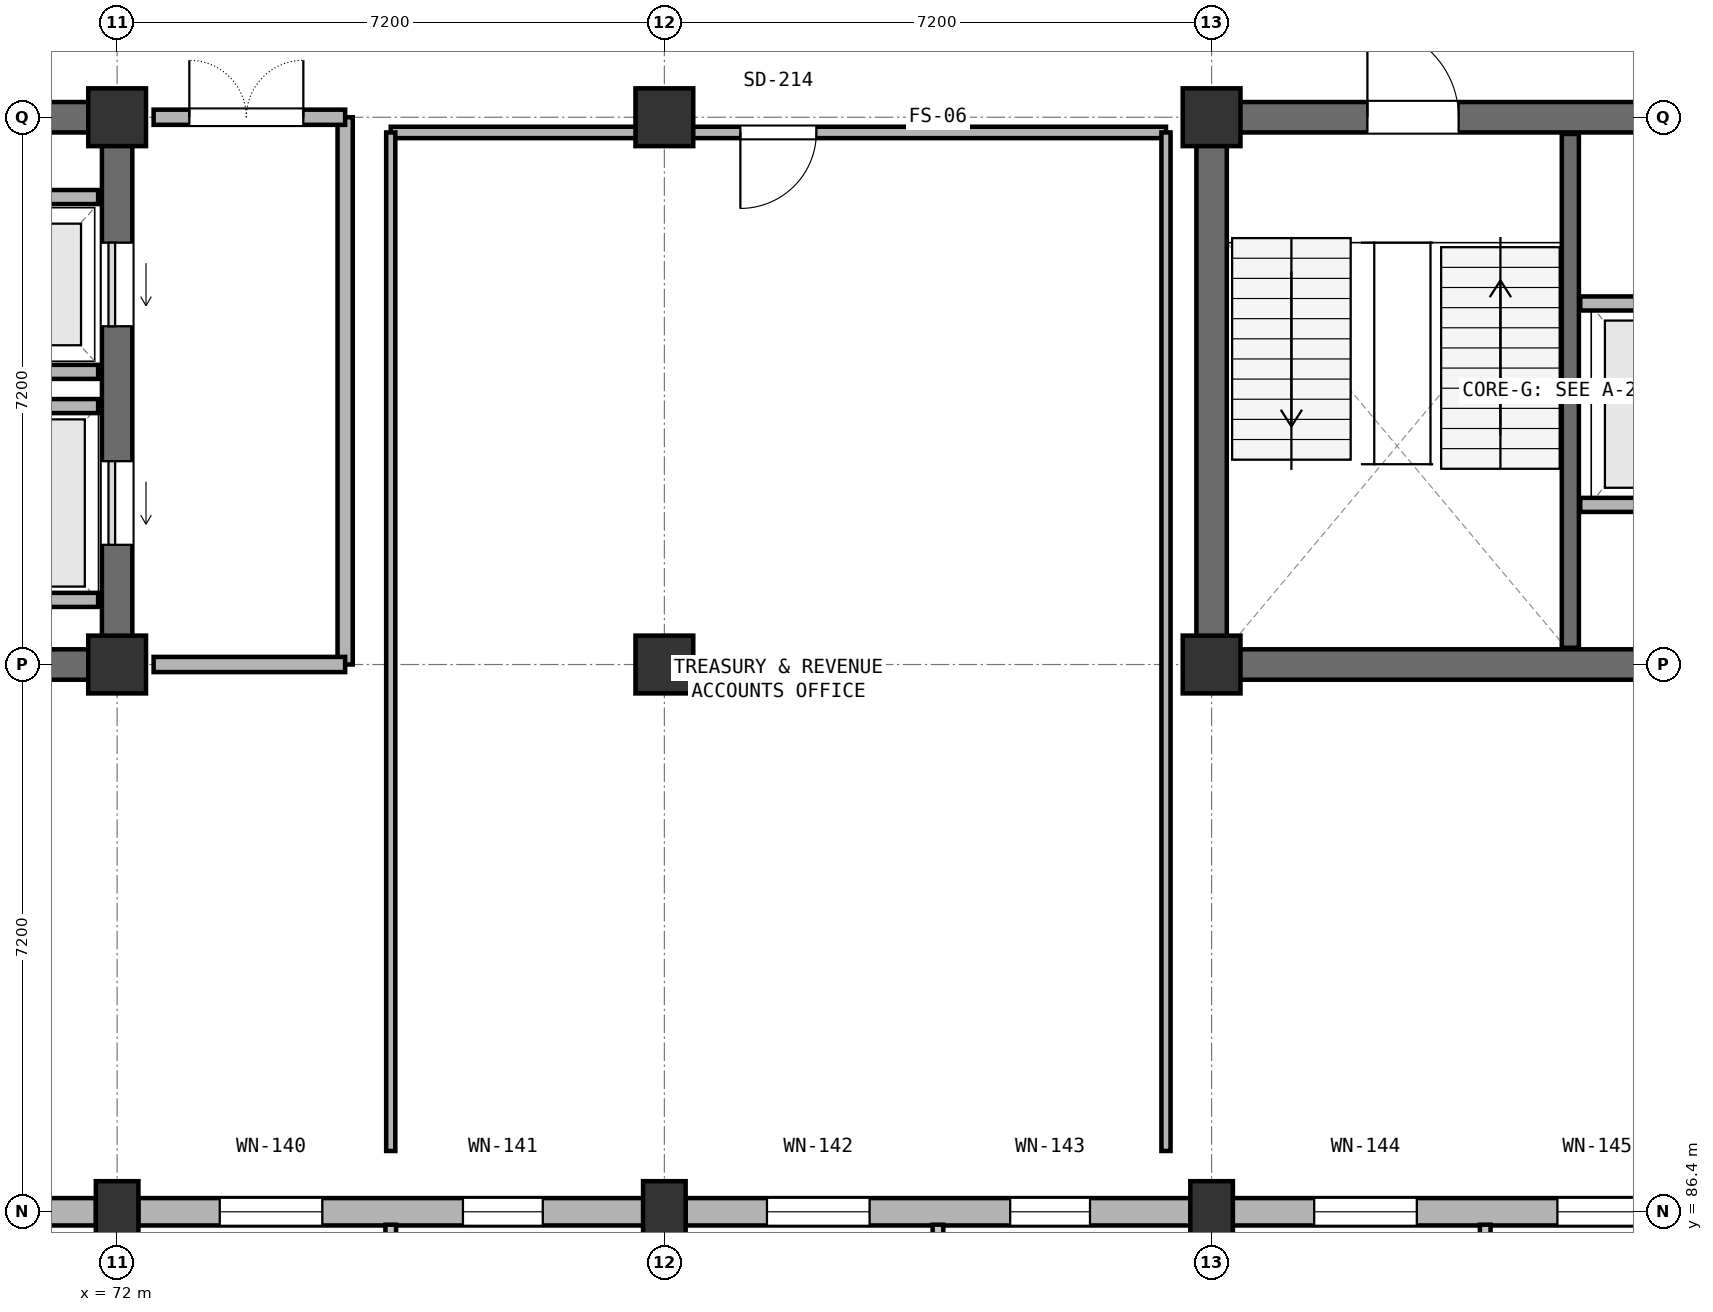
"""IFC4 building model, lengths in metres.
Left out: names, types, materials, properties, quantities, classifications, styles, units other than length and angle.
Written with IfcOpenShell. Run it as: python <this file> out.ifc"""

import sys

from ifc_helpers import new_model, si_unit, direction, frame, frame_2d, origin, origin_2d, place, context, subcontext, project, spatial, rectangle, extrude, element, fill, save


model = new_model("IFC4")
c1 = context("Model", 3, precision=1e-05, world=origin(), true_north=direction((0.0, 1.0)))
c2 = subcontext(c1, "Body", "Model", "MODEL_VIEW")
j1 = project(units=[si_unit("LENGTHUNIT", "METRE"), si_unit("PLANEANGLEUNIT", "RADIAN")], contexts=[c1])
p1 = place(None, origin())
s1 = spatial("IfcSite", under=j1, at=p1, CompositionType="ELEMENT")
p2 = place(p1, origin())
s2 = spatial("IfcBuilding", under=s1, at=p2, CompositionType="ELEMENT")
p3 = place(p2, frame((0.0, 0.0, 18.6)))
s3 = spatial("IfcBuildingStorey", under=s2, at=p3, CompositionType="ELEMENT", Elevation=18.6)
p4 = place(p3, frame((72.0, 86.4, 0.0), z_axis=(0.0, 0.0, 1.0), x_axis=(1.0, 0.0, 0.0)))
e1 = element("IfcColumn", 1, at=p4, inside=s3, PredefinedType="COLUMN", context=c2, shape_type="SweptSolid", body=[
    extrude(rectangle(XDim=0.56, YDim=0.805, at=origin_2d()), origin(), (0.0, 0.0, 1.0), 3.9),
])
for number, where, z_axis, x_axis in (
    (2, (72.0, 93.6, 0.0), (0.0, 0.0, 1.0), (1.0, 0.0, 0.0)),
    (3, (72.0, 100.8, 0.0), (0.0, 0.0, 1.0), (1.0, 0.0, 0.0)),
):
    element("IfcColumn", number, at=place(p3, frame(where, z_axis=z_axis, x_axis=x_axis)), inside=s3, PredefinedType="COLUMN", context=c2, shape_type="SweptSolid", body=[
        extrude(rectangle(XDim=0.76, YDim=0.76, at=origin_2d()), origin(), (0.0, 0.0, 1.0), 3.9),
    ])
p5 = place(p3, frame((79.2, 86.4, 0.0), z_axis=(0.0, 0.0, 1.0), x_axis=(1.0, 0.0, 0.0)))
e4 = element("IfcColumn", 4, at=p5, inside=s3, PredefinedType="COLUMN", context=c2, shape_type="SweptSolid", body=[
    extrude(rectangle(XDim=0.56, YDim=0.805, at=origin_2d()), origin(), (0.0, 0.0, 1.0), 3.9),
])
for number, where, z_axis, x_axis in (
    (5, (79.2, 93.6, 0.0), (0.0, 0.0, 1.0), (1.0, 0.0, 0.0)),
    (6, (79.2, 100.8, 0.0), (0.0, 0.0, 1.0), (1.0, 0.0, 0.0)),
):
    element("IfcColumn", number, at=place(p3, frame(where, z_axis=z_axis, x_axis=x_axis)), inside=s3, PredefinedType="COLUMN", context=c2, shape_type="SweptSolid", body=[
        extrude(rectangle(XDim=0.76, YDim=0.76, at=origin_2d()), origin(), (0.0, 0.0, 1.0), 3.9),
    ])
p6 = place(p3, frame((86.4, 86.4, 0.0), z_axis=(0.0, 0.0, 1.0), x_axis=(1.0, 0.0, 0.0)))
e7 = element("IfcColumn", 7, at=p6, inside=s3, PredefinedType="COLUMN", context=c2, shape_type="SweptSolid", body=[
    extrude(rectangle(XDim=0.56, YDim=0.805, at=origin_2d()), origin(), (0.0, 0.0, 1.0), 3.9),
])
for number, where, z_axis, x_axis in (
    (8, (86.4, 93.6, 0.0), (0.0, 0.0, 1.0), (1.0, 0.0, 0.0)),
    (9, (86.4, 100.8, 0.0), (0.0, 0.0, 1.0), (1.0, 0.0, 0.0)),
):
    element("IfcColumn", number, at=place(p3, frame(where, z_axis=z_axis, x_axis=x_axis)), inside=s3, PredefinedType="COLUMN", context=c2, shape_type="SweptSolid", body=[
        extrude(rectangle(XDim=0.76, YDim=0.76, at=origin_2d()), origin(), (0.0, 0.0, 1.0), 3.9),
    ])
p7 = place(p3, frame((65.15, 93.6, 0.0), z_axis=(0.0, 0.0, 1.0), x_axis=(1.0, 0.0, 0.0)))
e10 = element("IfcWall", 10, at=p7, inside=s3, PredefinedType="SHEAR", context=c2, shape_type="SweptSolid", body=[
    extrude(rectangle(XDim=6.5, YDim=0.4, at=frame_2d((3.25, 0.0))), origin(), (0.0, 0.0, 1.0), 3.9),
])
p8 = place(p3, frame((72.0, 93.95, 0.0), z_axis=(0.0, 0.0, 1.0), x_axis=(0.0, 1.0, 0.0)))
e11 = element("IfcWall", 11, at=p8, inside=s3, PredefinedType="SHEAR", context=c2, shape_type="SweptSolid", body=[
    extrude(rectangle(XDim=6.5, YDim=0.4, at=frame_2d((3.25, 0.0))), origin(), (0.0, 0.0, 1.0), 3.9),
])
p9 = place(p8, frame((1.225, 0.0, 0.0)))
e12 = element("IfcOpeningElement", 12, at=p9, cuts=e11, PredefinedType="OPENING", context=c2, shape_type="SweptSolid", body=[
    extrude(rectangle(XDim=1.1, YDim=2.2, at=frame_2d((0.55, 1.1))), frame((0.0, 0.21, 0.0), z_axis=(0.0, -1.0, 0.0), x_axis=(1.0, 0.0, 0.0)), (0.0, 0.0, 1.0), 0.42),
])
p10 = place(p8, frame((4.1, 0.0, 0.0)))
e13 = element("IfcOpeningElement", 13, at=p10, cuts=e11, PredefinedType="OPENING", context=c2, shape_type="SweptSolid", body=[
    extrude(rectangle(XDim=1.1, YDim=2.2, at=frame_2d((0.55, 1.1))), frame((0.0, 0.21, 0.0), z_axis=(0.0, -1.0, 0.0), x_axis=(1.0, 0.0, 0.0)), (0.0, 0.0, 1.0), 0.42),
])
p11 = place(p3, frame((71.65, 100.8, 0.0), z_axis=(0.0, 0.0, 1.0), x_axis=(-1.0, 0.0, 0.0)))
e14 = element("IfcWall", 14, at=p11, inside=s3, PredefinedType="SHEAR", context=c2, shape_type="SweptSolid", body=[
    extrude(rectangle(XDim=6.5, YDim=0.4, at=frame_2d((3.25, 0.0))), origin(), (0.0, 0.0, 1.0), 3.9),
])
p12 = place(p11, frame((3.6, 0.0, 0.0)))
e15 = element("IfcOpeningElement", 15, at=p12, cuts=e14, PredefinedType="OPENING", context=c2, shape_type="SweptSolid", body=[
    extrude(rectangle(XDim=1.2, YDim=2.2, at=frame_2d((0.6, 1.1))), frame((0.0, 0.21, 0.0), z_axis=(0.0, -1.0, 0.0), x_axis=(1.0, 0.0, 0.0)), (0.0, 0.0, 1.0), 0.42),
])
p13 = place(p3, frame((86.75, 93.6, 0.0), z_axis=(0.0, 0.0, 1.0), x_axis=(1.0, 0.0, 0.0)))
e16 = element("IfcWall", 16, at=p13, inside=s3, PredefinedType="SHEAR", context=c2, shape_type="SweptSolid", body=[
    extrude(rectangle(XDim=6.5, YDim=0.4, at=frame_2d((3.25, 0.0))), origin(), (0.0, 0.0, 1.0), 3.9),
])
p14 = place(p3, frame((93.25, 100.8, 0.0), z_axis=(0.0, 0.0, 1.0), x_axis=(-1.0, 0.0, 0.0)))
e17 = element("IfcWall", 17, at=p14, inside=s3, PredefinedType="SHEAR", context=c2, shape_type="SweptSolid", body=[
    extrude(rectangle(XDim=6.5, YDim=0.4, at=frame_2d((3.25, 0.0))), origin(), (0.0, 0.0, 1.0), 3.9),
])
p15 = place(p14, frame((3.6, 0.0, 0.0)))
e18 = element("IfcOpeningElement", 18, at=p15, cuts=e17, PredefinedType="OPENING", context=c2, shape_type="SweptSolid", body=[
    extrude(rectangle(XDim=1.2, YDim=2.2, at=frame_2d((0.6, 1.1))), frame((0.0, 0.21, 0.0), z_axis=(0.0, -1.0, 0.0), x_axis=(1.0, 0.0, 0.0)), (0.0, 0.0, 1.0), 0.42),
])
p16 = place(p3, frame((86.4, 100.45, 0.0), z_axis=(0.0, 0.0, 1.0), x_axis=(0.0, -1.0, 0.0)))
e19 = element("IfcWall", 19, at=p16, inside=s3, PredefinedType="SHEAR", context=c2, shape_type="SweptSolid", body=[
    extrude(rectangle(XDim=6.5, YDim=0.4, at=frame_2d((3.25, 0.0))), origin(), (0.0, 0.0, 1.0), 3.9),
])
p17 = place(p3, frame((91.12, 93.82, 0.0), z_axis=(0.0, 0.0, 1.0), x_axis=(0.0, 1.0, 0.0)))
e20 = element("IfcWall", 20, at=p17, inside=s3, PredefinedType="SHEAR", context=c2, shape_type="SweptSolid", body=[
    extrude(rectangle(XDim=6.76, YDim=0.225, at=frame_2d((3.38, 0.0))), origin(), (0.0, 0.0, 1.0), 3.9),
])
for number, where, z_axis, x_axis in (
    (21, (69.65, 94.45, 0.0), (0.0, 0.0, 1.0), (1.0, 0.0, 0.0)),
    (22, (69.65, 97.0, 0.0), (0.0, 0.0, 1.0), (1.0, 0.0, 0.0)),
    (23, (69.65, 97.45, 0.0), (0.0, 0.0, 1.0), (1.0, 0.0, 0.0)),
    (24, (69.65, 99.75, 0.0), (0.0, 0.0, 1.0), (1.0, 0.0, 0.0)),
    (25, (91.25, 95.7, 0.0), (0.0, 0.0, 1.0), (1.0, 0.0, 0.0)),
    (26, (91.25, 98.35, 0.0), (0.0, 0.0, 1.0), (1.0, 0.0, 0.0)),
):
    element("IfcWall", number, at=place(p3, frame(where, z_axis=z_axis, x_axis=x_axis)), inside=s3, PredefinedType="PARTITIONING", context=c2, shape_type="SweptSolid", body=[
        extrude(rectangle(XDim=2.1, YDim=0.185, at=frame_2d((1.05, 0.0))), origin(), (0.0, 0.0, 1.0), 3.9),
    ])
p18 = place(p3, frame((65.078, 86.4, 0.0), z_axis=(0.0, 0.0, 1.0), x_axis=(1.0, 0.0, 0.0)))
e27 = element("IfcWall", 27, at=p18, inside=s3, PredefinedType="SOLIDWALL", context=c2, shape_type="SweptSolid", body=[
    extrude(rectangle(XDim=6.644, YDim=0.36, at=frame_2d((3.322, 0.0))), origin(), (0.0, 0.0, 1.0), 2.74),
])
p19 = place(p18, frame((1.072, 0.0, 0.7)))
e28 = element("IfcOpeningElement", 28, at=p19, cuts=e27, PredefinedType="OPENING", context=c2, shape_type="SweptSolid", body=[
    extrude(rectangle(XDim=1.35, YDim=1.89, at=frame_2d((0.675, 0.945))), frame((0.0, 0.19, 0.0), z_axis=(0.0, -1.0, 0.0), x_axis=(1.0, 0.0, 0.0)), (0.0, 0.0, 1.0), 0.38),
])
p20 = place(p18, frame((4.272, 0.0, 0.7)))
e29 = element("IfcOpeningElement", 29, at=p20, cuts=e27, PredefinedType="OPENING", context=c2, shape_type="SweptSolid", body=[
    extrude(rectangle(XDim=1.05, YDim=1.89, at=frame_2d((0.525, 0.945))), frame((0.0, 0.19, 0.0), z_axis=(0.0, -1.0, 0.0), x_axis=(1.0, 0.0, 0.0)), (0.0, 0.0, 1.0), 0.38),
])
p21 = place(p3, frame((72.278, 86.4, 0.0), z_axis=(0.0, 0.0, 1.0), x_axis=(1.0, 0.0, 0.0)))
e30 = element("IfcWall", 30, at=p21, inside=s3, PredefinedType="SOLIDWALL", context=c2, shape_type="SweptSolid", body=[
    extrude(rectangle(XDim=6.644, YDim=0.36, at=frame_2d((3.322, 0.0))), origin(), (0.0, 0.0, 1.0), 2.74),
])
p22 = place(p21, frame((1.072, 0.0, 0.7)))
e31 = element("IfcOpeningElement", 31, at=p22, cuts=e30, PredefinedType="OPENING", context=c2, shape_type="SweptSolid", body=[
    extrude(rectangle(XDim=1.35, YDim=1.89, at=frame_2d((0.675, 0.945))), frame((0.0, 0.19, 0.0), z_axis=(0.0, -1.0, 0.0), x_axis=(1.0, 0.0, 0.0)), (0.0, 0.0, 1.0), 0.38),
])
p23 = place(p21, frame((4.272, 0.0, 0.7)))
e32 = element("IfcOpeningElement", 32, at=p23, cuts=e30, PredefinedType="OPENING", context=c2, shape_type="SweptSolid", body=[
    extrude(rectangle(XDim=1.05, YDim=1.89, at=frame_2d((0.525, 0.945))), frame((0.0, 0.19, 0.0), z_axis=(0.0, -1.0, 0.0), x_axis=(1.0, 0.0, 0.0)), (0.0, 0.0, 1.0), 0.38),
])
p24 = place(p3, frame((79.478, 86.4, 0.0), z_axis=(0.0, 0.0, 1.0), x_axis=(1.0, 0.0, 0.0)))
e33 = element("IfcWall", 33, at=p24, inside=s3, PredefinedType="SOLIDWALL", context=c2, shape_type="SweptSolid", body=[
    extrude(rectangle(XDim=6.644, YDim=0.36, at=frame_2d((3.322, 0.0))), origin(), (0.0, 0.0, 1.0), 2.74),
])
p25 = place(p24, frame((1.072, 0.0, 0.7)))
e34 = element("IfcOpeningElement", 34, at=p25, cuts=e33, PredefinedType="OPENING", context=c2, shape_type="SweptSolid", body=[
    extrude(rectangle(XDim=1.35, YDim=1.89, at=frame_2d((0.675, 0.945))), frame((0.0, 0.19, 0.0), z_axis=(0.0, -1.0, 0.0), x_axis=(1.0, 0.0, 0.0)), (0.0, 0.0, 1.0), 0.38),
])
p26 = place(p24, frame((4.272, 0.0, 0.7)))
e35 = element("IfcOpeningElement", 35, at=p26, cuts=e33, PredefinedType="OPENING", context=c2, shape_type="SweptSolid", body=[
    extrude(rectangle(XDim=1.05, YDim=1.89, at=frame_2d((0.525, 0.945))), frame((0.0, 0.19, 0.0), z_axis=(0.0, -1.0, 0.0), x_axis=(1.0, 0.0, 0.0)), (0.0, 0.0, 1.0), 0.38),
])
p27 = place(p3, frame((86.678, 86.4, 0.0), z_axis=(0.0, 0.0, 1.0), x_axis=(1.0, 0.0, 0.0)))
e36 = element("IfcWall", 36, at=p27, inside=s3, PredefinedType="SOLIDWALL", context=c2, shape_type="SweptSolid", body=[
    extrude(rectangle(XDim=6.644, YDim=0.36, at=frame_2d((3.322, 0.0))), origin(), (0.0, 0.0, 1.0), 2.74),
])
p28 = place(p27, frame((1.072, 0.0, 0.7)))
e37 = element("IfcOpeningElement", 37, at=p28, cuts=e36, PredefinedType="OPENING", context=c2, shape_type="SweptSolid", body=[
    extrude(rectangle(XDim=1.35, YDim=1.89, at=frame_2d((0.675, 0.945))), frame((0.0, 0.19, 0.0), z_axis=(0.0, -1.0, 0.0), x_axis=(1.0, 0.0, 0.0)), (0.0, 0.0, 1.0), 0.38),
])
p29 = place(p27, frame((4.272, 0.0, 0.7)))
e38 = element("IfcOpeningElement", 38, at=p29, cuts=e36, PredefinedType="OPENING", context=c2, shape_type="SweptSolid", body=[
    extrude(rectangle(XDim=1.05, YDim=1.89, at=frame_2d((0.525, 0.945))), frame((0.0, 0.19, 0.0), z_axis=(0.0, -1.0, 0.0), x_axis=(1.0, 0.0, 0.0)), (0.0, 0.0, 1.0), 0.38),
])
p30 = place(p3, frame((75.0, 93.6, 0.0), z_axis=(0.0, 0.0, 1.0), x_axis=(0.0, 1.0, 0.0)))
e39 = element("IfcWall", 39, at=p30, inside=s3, PredefinedType="PARTITIONING", context=c2, shape_type="SweptSolid", body=[
    extrude(rectangle(XDim=7.2, YDim=0.2, at=frame_2d((3.6, 0.0))), origin(), (0.0, 0.0, 1.0), 2.78),
])
p31 = place(p3, frame((72.48, 93.6, 0.0), z_axis=(0.0, 0.0, 1.0), x_axis=(1.0, 0.0, 0.0)))
e40 = element("IfcWall", 40, at=p31, inside=s3, PredefinedType="PARTITIONING", context=c2, shape_type="SweptSolid", body=[
    extrude(rectangle(XDim=2.52, YDim=0.2, at=frame_2d((1.26, 0.0))), origin(), (0.0, 0.0, 1.0), 2.78),
])
p32 = place(p3, frame((75.0, 100.8, 0.0), z_axis=(0.0, 0.0, 1.0), x_axis=(-1.0, 0.0, 0.0)))
e41 = element("IfcWall", 41, at=p32, inside=s3, PredefinedType="PARTITIONING", context=c2, shape_type="SweptSolid", body=[
    extrude(rectangle(XDim=2.52, YDim=0.2, at=frame_2d((1.26, 0.0))), origin(), (0.0, 0.0, 1.0), 2.78),
])
p33 = place(p32, frame((0.55, 0.0, 0.0)))
e42 = element("IfcOpeningElement", 42, at=p33, cuts=e41, PredefinedType="OPENING", context=c2, shape_type="SweptSolid", body=[
    extrude(rectangle(XDim=1.5, YDim=2.2, at=frame_2d((0.75, 1.1))), frame((0.0, 0.11, 0.0), z_axis=(0.0, -1.0, 0.0), x_axis=(1.0, 0.0, 0.0)), (0.0, 0.0, 1.0), 0.22),
])
p34 = place(p3, frame((85.8, 100.6, 0.0), z_axis=(0.0, 0.0, 1.0), x_axis=(-1.0, 0.0, 0.0)))
e43 = element("IfcWall", 43, at=p34, inside=s3, PredefinedType="PARTITIONING", context=c2, shape_type="SweptSolid", body=[
    extrude(rectangle(XDim=10.2, YDim=0.15, at=frame_2d((5.1, 0.0))), origin(), (0.0, 0.0, 1.0), 2.78),
])
p35 = place(p34, frame((4.6, 0.0, 0.0)))
e44 = element("IfcOpeningElement", 44, at=p35, cuts=e43, PredefinedType="OPENING", context=c2, shape_type="SweptSolid", body=[
    extrude(rectangle(XDim=1.0, YDim=2.15, at=frame_2d((0.5, 1.075))), frame((0.0, 0.085, 0.0), z_axis=(0.0, -1.0, 0.0), x_axis=(1.0, 0.0, 0.0)), (0.0, 0.0, 1.0), 0.17),
])
for number, where, z_axis, x_axis in (
    (45, (75.6, 87.2, 0.0), (0.0, 0.0, 1.0), (0.0, 1.0, 0.0)),
    (46, (85.8, 100.6, 0.0), (0.0, 0.0, 1.0), (0.0, -1.0, 0.0)),
):
    element("IfcWall", number, at=place(p3, frame(where, z_axis=z_axis, x_axis=x_axis)), inside=s3, PredefinedType="PARTITIONING", context=c2, shape_type="SweptSolid", body=[
        extrude(rectangle(XDim=13.4, YDim=0.12, at=frame_2d((6.7, 0.0))), origin(), (0.0, 0.0, 1.0), 2.78),
    ])
p36 = place(p9, origin())
e47 = element("IfcDoor", 47, at=p36, inside=s3, OperationType="SLIDING_TO_LEFT", PredefinedType="DOOR", context=c2, shape_type="SweptSolid", body=[
    extrude(rectangle(XDim=1.1, YDim=2.2, at=frame_2d((0.55, 1.1))), frame((0.0, 0.025, 0.0), z_axis=(0.0, -1.0, 0.0), x_axis=(1.0, 0.0, 0.0)), (0.0, 0.0, 1.0), 0.05),
])
fill(e12, e47)
p37 = place(p10, origin())
e48 = element("IfcDoor", 48, at=p37, inside=s3, OperationType="SLIDING_TO_LEFT", PredefinedType="DOOR", context=c2, shape_type="SweptSolid", body=[
    extrude(rectangle(XDim=1.1, YDim=2.2, at=frame_2d((0.55, 1.1))), frame((0.0, 0.025, 0.0), z_axis=(0.0, -1.0, 0.0), x_axis=(1.0, 0.0, 0.0)), (0.0, 0.0, 1.0), 0.05),
])
fill(e13, e48)
p38 = place(p22, origin())
e49 = element("IfcWindow", 49, at=p38, inside=s3, PartitioningType="DOUBLE_PANEL_VERTICAL", PredefinedType="WINDOW", context=c2, shape_type="SweptSolid", body=[
    extrude(rectangle(XDim=1.35, YDim=1.89, at=frame_2d((0.675, 0.945))), frame((0.0, 0.03, 0.0), z_axis=(0.0, -1.0, 0.0), x_axis=(1.0, 0.0, 0.0)), (0.0, 0.0, 1.0), 0.06),
])
fill(e31, e49)
p39 = place(p23, origin())
e50 = element("IfcWindow", 50, at=p39, inside=s3, PartitioningType="SINGLE_PANEL", PredefinedType="WINDOW", context=c2, shape_type="SweptSolid", body=[
    extrude(rectangle(XDim=1.05, YDim=1.89, at=frame_2d((0.525, 0.945))), frame((0.0, 0.03, 0.0), z_axis=(0.0, -1.0, 0.0), x_axis=(1.0, 0.0, 0.0)), (0.0, 0.0, 1.0), 0.06),
])
fill(e32, e50)
p40 = place(p25, origin())
e51 = element("IfcWindow", 51, at=p40, inside=s3, PartitioningType="DOUBLE_PANEL_VERTICAL", PredefinedType="WINDOW", context=c2, shape_type="SweptSolid", body=[
    extrude(rectangle(XDim=1.35, YDim=1.89, at=frame_2d((0.675, 0.945))), frame((0.0, 0.03, 0.0), z_axis=(0.0, -1.0, 0.0), x_axis=(1.0, 0.0, 0.0)), (0.0, 0.0, 1.0), 0.06),
])
fill(e34, e51)
p41 = place(p26, origin())
e52 = element("IfcWindow", 52, at=p41, inside=s3, PartitioningType="SINGLE_PANEL", PredefinedType="WINDOW", context=c2, shape_type="SweptSolid", body=[
    extrude(rectangle(XDim=1.05, YDim=1.89, at=frame_2d((0.525, 0.945))), frame((0.0, 0.03, 0.0), z_axis=(0.0, -1.0, 0.0), x_axis=(1.0, 0.0, 0.0)), (0.0, 0.0, 1.0), 0.06),
])
fill(e35, e52)
p42 = place(p28, origin())
e53 = element("IfcWindow", 53, at=p42, inside=s3, PartitioningType="DOUBLE_PANEL_VERTICAL", PredefinedType="WINDOW", context=c2, shape_type="SweptSolid", body=[
    extrude(rectangle(XDim=1.35, YDim=1.89, at=frame_2d((0.675, 0.945))), frame((0.0, 0.03, 0.0), z_axis=(0.0, -1.0, 0.0), x_axis=(1.0, 0.0, 0.0)), (0.0, 0.0, 1.0), 0.06),
])
fill(e37, e53)
p43 = place(p29, origin())
e54 = element("IfcWindow", 54, at=p43, inside=s3, PartitioningType="SINGLE_PANEL", PredefinedType="WINDOW", context=c2, shape_type="SweptSolid", body=[
    extrude(rectangle(XDim=1.05, YDim=1.89, at=frame_2d((0.525, 0.945))), frame((0.0, 0.03, 0.0), z_axis=(0.0, -1.0, 0.0), x_axis=(1.0, 0.0, 0.0)), (0.0, 0.0, 1.0), 0.06),
])
fill(e38, e54)
p44 = place(p33, frame((1.5, 0.0, 0.0), z_axis=(0.0, 0.0, 1.0), x_axis=(-1.0, 0.0, 0.0)))
e55 = element("IfcDoor", 55, at=p44, inside=s3, OperationType="DOUBLE_DOOR_SINGLE_SWING", PredefinedType="DOOR", context=c2, shape_type="SweptSolid", body=[
    extrude(rectangle(XDim=1.5, YDim=2.2, at=frame_2d((0.75, 1.1))), frame((0.0, 0.025, 0.0), z_axis=(0.0, -1.0, 0.0), x_axis=(1.0, 0.0, 0.0)), (0.0, 0.0, 1.0), 0.05),
])
fill(e42, e55)
p45 = place(p15, frame((1.2, 0.0, 0.0), z_axis=(0.0, 0.0, 1.0), x_axis=(-1.0, 0.0, 0.0)))
e56 = element("IfcDoor", 56, at=p45, inside=s3, OperationType="SINGLE_SWING_LEFT", PredefinedType="DOOR", context=c2, shape_type="SweptSolid", body=[
    extrude(rectangle(XDim=1.2, YDim=2.2, at=frame_2d((0.6, 1.1))), frame((0.0, 0.025, 0.0), z_axis=(0.0, -1.0, 0.0), x_axis=(1.0, 0.0, 0.0)), (0.0, 0.0, 1.0), 0.05),
])
fill(e18, e56)
p46 = place(p35, origin())
e57 = element("IfcDoor", 57, at=p46, inside=s3, OperationType="SINGLE_SWING_RIGHT", PredefinedType="DOOR", context=c2, shape_type="SweptSolid", body=[
    extrude(rectangle(XDim=1.0, YDim=2.15, at=frame_2d((0.5, 1.075))), frame((0.0, 0.025, 0.0), z_axis=(0.0, -1.0, 0.0), x_axis=(1.0, 0.0, 0.0)), (0.0, 0.0, 1.0), 0.05),
])
fill(e44, e57)
save(model, sys.argv[1])
